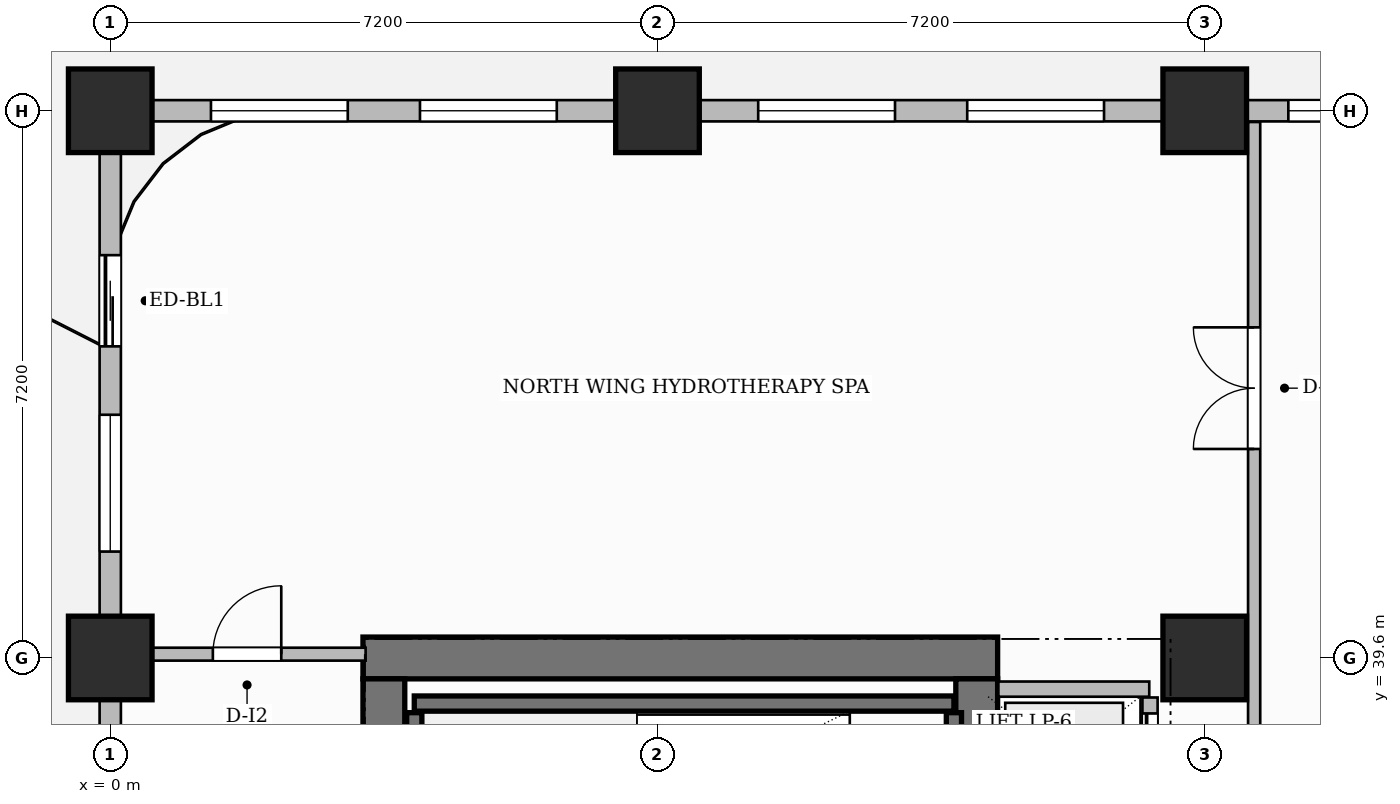
"""IFC4 building model, lengths in metres.
Left out: names, types, materials, properties, quantities, classifications, styles, units other than length and angle.
Written with IfcOpenShell. Run it as: python <this file> out.ifc"""

import sys

from ifc_helpers import new_model, si_unit, direction, frame, frame_2d, origin, origin_2d, place, context, subcontext, project, spatial, rectangle, extrude, source, transform, mapped, element, fill, save


model = new_model("IFC4")
c1 = context("Model", 3, precision=1e-05, world=origin(), true_north=direction((0.0, 1.0)))
c2 = subcontext(c1, "Body", "Model", "MODEL_VIEW")
j1 = project(units=[si_unit("LENGTHUNIT", "METRE"), si_unit("PLANEANGLEUNIT", "RADIAN")], contexts=[c1])
p1 = place(None, origin())
s1 = spatial("IfcSite", under=j1, at=p1, CompositionType="ELEMENT")
p2 = place(p1, origin())
s2 = spatial("IfcBuilding", under=s1, at=p2, CompositionType="ELEMENT")
p3 = place(p2, frame((0.0, 0.0, 102.7)))
s3 = spatial("IfcBuildingStorey", under=s2, at=p3, CompositionType="ELEMENT", Elevation=102.7)
p4 = place(p3, frame((3.325, 39.6, 0.0), z_axis=(0.0, 0.0, 1.0), x_axis=(1.0, 0.0, 0.0)))
e1 = element("IfcWall", 1, at=p4, inside=s3, PredefinedType="SHEAR", context=c2, shape_type="SweptSolid", body=[
    extrude(rectangle(XDim=8.35, YDim=0.55, at=frame_2d((4.175, 0.0))), origin(), (0.0, 0.0, 1.0), 3.7),
])
p5 = place(p3, frame((3.6, 25.475, 0.0), z_axis=(0.0, 0.0, 1.0), x_axis=(0.0, 1.0, 0.0)))
e2 = element("IfcWall", 2, at=p5, inside=s3, PredefinedType="SHEAR", context=c2, shape_type="SweptSolid", body=[
    extrude(rectangle(XDim=13.85, YDim=0.55, at=frame_2d((6.925, 0.0))), origin(), (0.0, 0.0, 1.0), 3.7),
])
p6 = place(p3, frame((11.4, 25.475, 0.0), z_axis=(0.0, 0.0, 1.0), x_axis=(0.0, 1.0, 0.0)))
e3 = element("IfcWall", 3, at=p6, inside=s3, PredefinedType="SHEAR", context=c2, shape_type="SweptSolid", body=[
    extrude(rectangle(XDim=13.85, YDim=0.55, at=frame_2d((6.925, 0.0))), origin(), (0.0, 0.0, 1.0), 3.7),
])
p7 = place(p6, frame((6.495, 0.0, 0.0)))
e4 = element("IfcOpeningElement", 4, at=p7, cuts=e3, PredefinedType="OPENING", context=c2, shape_type="SweptSolid", body=[
    extrude(rectangle(XDim=1.5, YDim=2.2, at=frame_2d((0.75, 1.1))), frame((0.0, 0.285, 0.0), z_axis=(0.0, -1.0, 0.0), x_axis=(1.0, 0.0, 0.0)), (0.0, 0.0, 1.0), 0.57),
])
m1 = source(origin(), c2, "Body", "SweptSolid", [
    extrude(rectangle(XDim=1.1, YDim=1.1, at=origin_2d()), origin(), (0.0, 0.0, 1.0), 3.7),
])
for number, where, z_axis, x_axis in (
    (5, (0.0, 39.6, 0.0), (0.0, 0.0, 1.0), (1.0, 0.0, 0.0)),
    (6, (0.0, 46.8, 0.0), (0.0, 0.0, 1.0), (1.0, 0.0, 0.0)),
    (7, (7.2, 46.8, 0.0), (0.0, 0.0, 1.0), (1.0, 0.0, 0.0)),
    (8, (14.4, 39.6, 0.0), (0.0, 0.0, 1.0), (1.0, 0.0, 0.0)),
    (9, (14.4, 46.8, 0.0), (0.0, 0.0, 1.0), (1.0, 0.0, 0.0)),
):
    element("IfcColumn", number, at=place(p3, frame(where, z_axis=z_axis, x_axis=x_axis)), inside=s3, PredefinedType="COLUMN", context=c2, shape_type="MappedRepresentation", body=[
        mapped(m1, transform((0.0, 0.0, 0.0), scale=1.0)),
    ])
p8 = place(p3, frame((4.0, 39.0, 0.0), z_axis=(0.0, 0.0, 1.0), x_axis=(1.0, 0.0, 0.0)))
e10 = element("IfcWall", 10, at=p8, inside=s3, PredefinedType="SHEAR", context=c2, shape_type="SweptSolid", body=[
    extrude(rectangle(XDim=7.1, YDim=0.2, at=frame_2d((3.55, 0.0))), origin(), (0.0, 0.0, 1.0), 3.7),
])
for number, where, z_axis, x_axis in (
    (11, (4.0, 36.18, 0.0), (0.0, 0.0, 1.0), (0.0, 1.0, 0.0)),
    (12, (11.1, 36.18, 0.0), (0.0, 0.0, 1.0), (0.0, 1.0, 0.0)),
):
    element("IfcWall", number, at=place(p3, frame(where, z_axis=z_axis, x_axis=x_axis)), inside=s3, PredefinedType="SHEAR", context=c2, shape_type="SweptSolid", body=[
        extrude(rectangle(XDim=2.7, YDim=0.2, at=frame_2d((1.35, 0.0))), origin(), (0.0, 0.0, 1.0), 3.7),
    ])
p9 = place(p3, frame((11.685, 39.19, 0.0), z_axis=(0.0, 0.0, 1.0), x_axis=(1.0, 0.0, 0.0)))
e13 = element("IfcWall", 13, at=p9, inside=s3, PredefinedType="PARTITIONING", context=c2, shape_type="SweptSolid", body=[
    extrude(rectangle(XDim=1.985, YDim=0.2, at=frame_2d((0.992, 0.0))), origin(), (0.0, 0.0, 1.0), 3.4),
])
p10 = place(p3, frame((13.68, 34.36, 0.0), z_axis=(0.0, 0.0, 1.0), x_axis=(0.0, 1.0, 0.0)))
e14 = element("IfcWall", 14, at=p10, inside=s3, PredefinedType="PARTITIONING", context=c2, shape_type="SweptSolid", body=[
    extrude(rectangle(XDim=4.72, YDim=0.2, at=frame_2d((2.36, 0.0))), origin(), (0.0, 0.0, 1.0), 3.4),
])
p11 = place(p10, frame((0.21, 0.0, 0.0)))
e15 = element("IfcOpeningElement", 15, at=p11, cuts=e14, PredefinedType="OPENING", context=c2, shape_type="SweptSolid", body=[
    extrude(rectangle(XDim=1.1, YDim=2.2, at=frame_2d((0.55, 1.1))), frame((0.0, 0.11, 0.0), z_axis=(0.0, -1.0, 0.0), x_axis=(1.0, 0.0, 0.0)), (0.0, 0.0, 1.0), 0.22),
])
p12 = place(p10, frame((1.81, 0.0, 0.0)))
e16 = element("IfcOpeningElement", 16, at=p12, cuts=e14, PredefinedType="OPENING", context=c2, shape_type="SweptSolid", body=[
    extrude(rectangle(XDim=1.1, YDim=2.2, at=frame_2d((0.55, 1.1))), frame((0.0, 0.11, 0.0), z_axis=(0.0, -1.0, 0.0), x_axis=(1.0, 0.0, 0.0)), (0.0, 0.0, 1.0), 0.22),
])
p13 = place(p10, frame((3.41, 0.0, 0.0)))
e17 = element("IfcOpeningElement", 17, at=p13, cuts=e14, PredefinedType="OPENING", context=c2, shape_type="SweptSolid", body=[
    extrude(rectangle(XDim=1.1, YDim=2.2, at=frame_2d((0.55, 1.1))), frame((0.0, 0.11, 0.0), z_axis=(0.0, -1.0, 0.0), x_axis=(1.0, 0.0, 0.0)), (0.0, 0.0, 1.0), 0.22),
])
p14 = place(p3, frame((0.24, 39.65, 0.0), z_axis=(0.0, 0.0, 1.0), x_axis=(1.0, 0.0, 0.0)))
e18 = element("IfcWall", 18, at=p14, inside=s3, PredefinedType="PARTITIONING", context=c2, shape_type="SweptSolid", body=[
    extrude(rectangle(XDim=3.12, YDim=0.17, at=frame_2d((1.56, 0.0))), origin(), (0.0, 0.0, 1.0), 3.4),
])
p15 = place(p14, frame((1.11, 0.0, 0.0)))
e19 = element("IfcOpeningElement", 19, at=p15, cuts=e18, PredefinedType="OPENING", context=c2, shape_type="SweptSolid", body=[
    extrude(rectangle(XDim=0.9, YDim=2.15, at=frame_2d((0.45, 1.075))), frame((0.0, 0.095, 0.0), z_axis=(0.0, -1.0, 0.0), x_axis=(1.0, 0.0, 0.0)), (0.0, 0.0, 1.0), 0.19),
])
p16 = place(p3, frame((15.05, 34.34, 0.0), z_axis=(0.0, 0.0, 1.0), x_axis=(0.0, 1.0, 0.0)))
e20 = element("IfcWall", 20, at=p16, inside=s3, PredefinedType="PARTITIONING", context=c2, shape_type="SweptSolid", body=[
    extrude(rectangle(XDim=12.312, YDim=0.16, at=frame_2d((6.156, 0.0))), origin(), (0.0, 0.0, 1.0), 3.4),
])
p17 = place(p16, frame((8.01, 0.0, 0.0)))
e21 = element("IfcOpeningElement", 21, at=p17, cuts=e20, PredefinedType="OPENING", context=c2, shape_type="SweptSolid", body=[
    extrude(rectangle(XDim=1.6, YDim=2.4, at=frame_2d((0.8, 1.2))), frame((0.0, 0.09, 0.0), z_axis=(0.0, -1.0, 0.0), x_axis=(1.0, 0.0, 0.0)), (0.0, 0.0, 1.0), 0.18),
])
p18 = place(p3, frame((0.0, 25.25, 0.0), z_axis=(0.0, 0.0, 1.0), x_axis=(0.0, 1.0, 0.0)))
e22 = element("IfcWall", 22, at=p18, inside=s3, PredefinedType="SOLIDWALL", context=c2, shape_type="SweptSolid", body=[
    extrude(rectangle(XDim=21.5, YDim=0.28, at=frame_2d((10.75, 0.0))), origin(), (0.0, 0.0, 1.0), 2.835),
])
p19 = place(p18, frame((18.45, 0.0, 0.0)))
e23 = element("IfcOpeningElement", 23, at=p19, cuts=e22, PredefinedType="OPENING", context=c2, shape_type="SweptSolid", body=[
    extrude(rectangle(XDim=1.2, YDim=2.2, at=frame_2d((0.6, 1.1))), frame((0.0, 0.15, 0.0), z_axis=(0.0, -1.0, 0.0), x_axis=(1.0, 0.0, 0.0)), (0.0, 0.0, 1.0), 0.3),
])
p20 = place(p18, frame((0.8, 0.0, 0.0)))
e24 = element("IfcOpeningElement", 24, at=p20, cuts=e22, PredefinedType="OPENING", context=c2, shape_type="SweptSolid", body=[
    extrude(rectangle(XDim=1.2, YDim=2.2, at=frame_2d((0.6, 1.1))), frame((0.0, 0.15, 0.0), z_axis=(0.0, -1.0, 0.0), x_axis=(1.0, 0.0, 0.0)), (0.0, 0.0, 1.0), 0.3),
])
p21 = place(p18, frame((3.425, 0.0, 0.8)))
e25 = element("IfcOpeningElement", 25, at=p21, cuts=e22, PredefinedType="OPENING", context=c2, shape_type="SweptSolid", body=[
    extrude(rectangle(XDim=1.8, YDim=1.85, at=frame_2d((0.9, 0.925))), frame((0.0, 0.15, 0.0), z_axis=(0.0, -1.0, 0.0), x_axis=(1.0, 0.0, 0.0)), (0.0, 0.0, 1.0), 0.3),
])
p22 = place(p18, frame((8.475, 0.0, 0.8)))
e26 = element("IfcOpeningElement", 26, at=p22, cuts=e22, PredefinedType="OPENING", context=c2, shape_type="SweptSolid", body=[
    extrude(rectangle(XDim=1.8, YDim=1.85, at=frame_2d((0.9, 0.925))), frame((0.0, 0.15, 0.0), z_axis=(0.0, -1.0, 0.0), x_axis=(1.0, 0.0, 0.0)), (0.0, 0.0, 1.0), 0.3),
])
p23 = place(p18, frame((11.225, 0.0, 0.8)))
e27 = element("IfcOpeningElement", 27, at=p23, cuts=e22, PredefinedType="OPENING", context=c2, shape_type="SweptSolid", body=[
    extrude(rectangle(XDim=1.8, YDim=1.85, at=frame_2d((0.9, 0.925))), frame((0.0, 0.15, 0.0), z_axis=(0.0, -1.0, 0.0), x_axis=(1.0, 0.0, 0.0)), (0.0, 0.0, 1.0), 0.3),
])
p24 = place(p18, frame((15.75, 0.0, 0.8)))
e28 = element("IfcOpeningElement", 28, at=p24, cuts=e22, PredefinedType="OPENING", context=c2, shape_type="SweptSolid", body=[
    extrude(rectangle(XDim=1.8, YDim=1.85, at=frame_2d((0.9, 0.925))), frame((0.0, 0.15, 0.0), z_axis=(0.0, -1.0, 0.0), x_axis=(1.0, 0.0, 0.0)), (0.0, 0.0, 1.0), 0.3),
])
p25 = place(p3, frame((0.0, 46.8, 0.0), z_axis=(0.0, 0.0, 1.0), x_axis=(1.0, 0.0, 0.0)))
e29 = element("IfcWall", 29, at=p25, inside=s3, PredefinedType="SOLIDWALL", context=c2, shape_type="SweptSolid", body=[
    extrude(rectangle(XDim=18.0, YDim=0.28, at=frame_2d((9.0, 0.0))), origin(), (0.0, 0.0, 1.0), 2.835),
])
p26 = place(p25, frame((1.325, 0.0, 0.8)))
e30 = element("IfcOpeningElement", 30, at=p26, cuts=e29, PredefinedType="OPENING", context=c2, shape_type="SweptSolid", body=[
    extrude(rectangle(XDim=1.8, YDim=1.85, at=frame_2d((0.9, 0.925))), frame((0.0, 0.15, 0.0), z_axis=(0.0, -1.0, 0.0), x_axis=(1.0, 0.0, 0.0)), (0.0, 0.0, 1.0), 0.3),
])
p27 = place(p25, frame((4.075, 0.0, 0.8)))
e31 = element("IfcOpeningElement", 31, at=p27, cuts=e29, PredefinedType="OPENING", context=c2, shape_type="SweptSolid", body=[
    extrude(rectangle(XDim=1.8, YDim=1.85, at=frame_2d((0.9, 0.925))), frame((0.0, 0.15, 0.0), z_axis=(0.0, -1.0, 0.0), x_axis=(1.0, 0.0, 0.0)), (0.0, 0.0, 1.0), 0.3),
])
p28 = place(p25, frame((8.525, 0.0, 0.8)))
e32 = element("IfcOpeningElement", 32, at=p28, cuts=e29, PredefinedType="OPENING", context=c2, shape_type="SweptSolid", body=[
    extrude(rectangle(XDim=1.8, YDim=1.85, at=frame_2d((0.9, 0.925))), frame((0.0, 0.15, 0.0), z_axis=(0.0, -1.0, 0.0), x_axis=(1.0, 0.0, 0.0)), (0.0, 0.0, 1.0), 0.3),
])
p29 = place(p25, frame((11.275, 0.0, 0.8)))
e33 = element("IfcOpeningElement", 33, at=p29, cuts=e29, PredefinedType="OPENING", context=c2, shape_type="SweptSolid", body=[
    extrude(rectangle(XDim=1.8, YDim=1.85, at=frame_2d((0.9, 0.925))), frame((0.0, 0.15, 0.0), z_axis=(0.0, -1.0, 0.0), x_axis=(1.0, 0.0, 0.0)), (0.0, 0.0, 1.0), 0.3),
])
p30 = place(p25, frame((15.5, 0.0, 0.8)))
e34 = element("IfcOpeningElement", 34, at=p30, cuts=e29, PredefinedType="OPENING", context=c2, shape_type="SweptSolid", body=[
    extrude(rectangle(XDim=1.4, YDim=1.85, at=frame_2d((0.7, 0.925))), frame((0.0, 0.15, 0.0), z_axis=(0.0, -1.0, 0.0), x_axis=(1.0, 0.0, 0.0)), (0.0, 0.0, 1.0), 0.3),
])
m2 = source(origin(), c2, "Body", "SweptSolid", [
    extrude(rectangle(XDim=0.9, YDim=2.15, at=frame_2d((0.45, 1.075))), frame((0.0, 0.025, 0.0), z_axis=(0.0, -1.0, 0.0), x_axis=(1.0, 0.0, 0.0)), (0.0, 0.0, 1.0), 0.05),
])
p31 = place(p15, origin())
e35 = element("IfcDoor", 35, at=p31, inside=s3, OperationType="SINGLE_SWING_RIGHT", PredefinedType="DOOR", context=c2, shape_type="MappedRepresentation", body=[
    mapped(m2, transform((0.0, 0.0, 0.0), scale=1.0)),
])
fill(e19, e35)
m3 = source(origin(), c2, "Body", "SweptSolid", [
    extrude(rectangle(XDim=1.6, YDim=2.4, at=frame_2d((0.8, 1.2))), frame((0.0, 0.025, 0.0), z_axis=(0.0, -1.0, 0.0), x_axis=(1.0, 0.0, 0.0)), (0.0, 0.0, 1.0), 0.05),
])
p32 = place(p17, origin())
e36 = element("IfcDoor", 36, at=p32, inside=s3, OperationType="DOUBLE_DOOR_SINGLE_SWING", PredefinedType="DOOR", context=c2, shape_type="MappedRepresentation", body=[
    mapped(m3, transform((0.0, 0.0, 0.0), scale=1.0)),
])
fill(e21, e36)
m4 = source(origin(), c2, "Body", "SweptSolid", [
    extrude(rectangle(XDim=1.1, YDim=2.2, at=frame_2d((0.55, 1.1))), frame((0.0, 0.025, 0.0), z_axis=(0.0, -1.0, 0.0), x_axis=(1.0, 0.0, 0.0)), (0.0, 0.0, 1.0), 0.05),
])
p33 = place(p13, origin())
e37 = element("IfcDoor", 37, at=p33, inside=s3, OperationType="SLIDING_TO_LEFT", PredefinedType="DOOR", context=c2, shape_type="MappedRepresentation", body=[
    mapped(m4, transform((0.0, 0.0, 0.0), scale=1.0)),
])
fill(e17, e37)
m5 = source(origin(), c2, "Body", "SweptSolid", [
    extrude(rectangle(XDim=1.2, YDim=2.2, at=frame_2d((0.6, 1.1))), frame((0.0, 0.025, 0.0), z_axis=(0.0, -1.0, 0.0), x_axis=(1.0, 0.0, 0.0)), (0.0, 0.0, 1.0), 0.05),
])
p34 = place(p19, origin())
e38 = element("IfcDoor", 38, at=p34, inside=s3, OperationType="SLIDING_TO_LEFT", PredefinedType="DOOR", context=c2, shape_type="MappedRepresentation", body=[
    mapped(m5, transform((0.0, 0.0, 0.0), scale=1.0)),
])
fill(e23, e38)
m6 = source(origin(), c2, "Body", "SweptSolid", [
    extrude(rectangle(XDim=1.8, YDim=1.85, at=frame_2d((0.9, 0.925))), frame((0.0, 0.03, 0.0), z_axis=(0.0, -1.0, 0.0), x_axis=(1.0, 0.0, 0.0)), (0.0, 0.0, 1.0), 0.06),
])
p35 = place(p24, origin())
e39 = element("IfcWindow", 39, at=p35, inside=s3, PartitioningType="DOUBLE_PANEL_VERTICAL", PredefinedType="WINDOW", context=c2, shape_type="MappedRepresentation", body=[
    mapped(m6, transform((0.0, 0.0, 0.0), scale=1.0)),
])
fill(e28, e39)
p36 = place(p26, origin())
e40 = element("IfcWindow", 40, at=p36, inside=s3, PartitioningType="DOUBLE_PANEL_VERTICAL", PredefinedType="WINDOW", context=c2, shape_type="MappedRepresentation", body=[
    mapped(m6, transform((0.0, 0.0, 0.0), scale=1.0)),
])
fill(e30, e40)
p37 = place(p27, origin())
e41 = element("IfcWindow", 41, at=p37, inside=s3, PartitioningType="DOUBLE_PANEL_VERTICAL", PredefinedType="WINDOW", context=c2, shape_type="MappedRepresentation", body=[
    mapped(m6, transform((0.0, 0.0, 0.0), scale=1.0)),
])
fill(e31, e41)
p38 = place(p28, origin())
e42 = element("IfcWindow", 42, at=p38, inside=s3, PartitioningType="DOUBLE_PANEL_VERTICAL", PredefinedType="WINDOW", context=c2, shape_type="MappedRepresentation", body=[
    mapped(m6, transform((0.0, 0.0, 0.0), scale=1.0)),
])
fill(e32, e42)
p39 = place(p29, origin())
e43 = element("IfcWindow", 43, at=p39, inside=s3, PartitioningType="DOUBLE_PANEL_VERTICAL", PredefinedType="WINDOW", context=c2, shape_type="MappedRepresentation", body=[
    mapped(m6, transform((0.0, 0.0, 0.0), scale=1.0)),
])
fill(e33, e43)
m7 = source(origin(), c2, "Body", "SweptSolid", [
    extrude(rectangle(XDim=1.4, YDim=1.85, at=frame_2d((0.7, 0.925))), frame((0.0, 0.03, 0.0), z_axis=(0.0, -1.0, 0.0), x_axis=(1.0, 0.0, 0.0)), (0.0, 0.0, 1.0), 0.06),
])
p40 = place(p30, origin())
e44 = element("IfcWindow", 44, at=p40, inside=s3, PartitioningType="SINGLE_PANEL", PredefinedType="WINDOW", context=c2, shape_type="MappedRepresentation", body=[
    mapped(m7, transform((0.0, 0.0, 0.0), scale=1.0)),
])
fill(e34, e44)
save(model, sys.argv[1])
